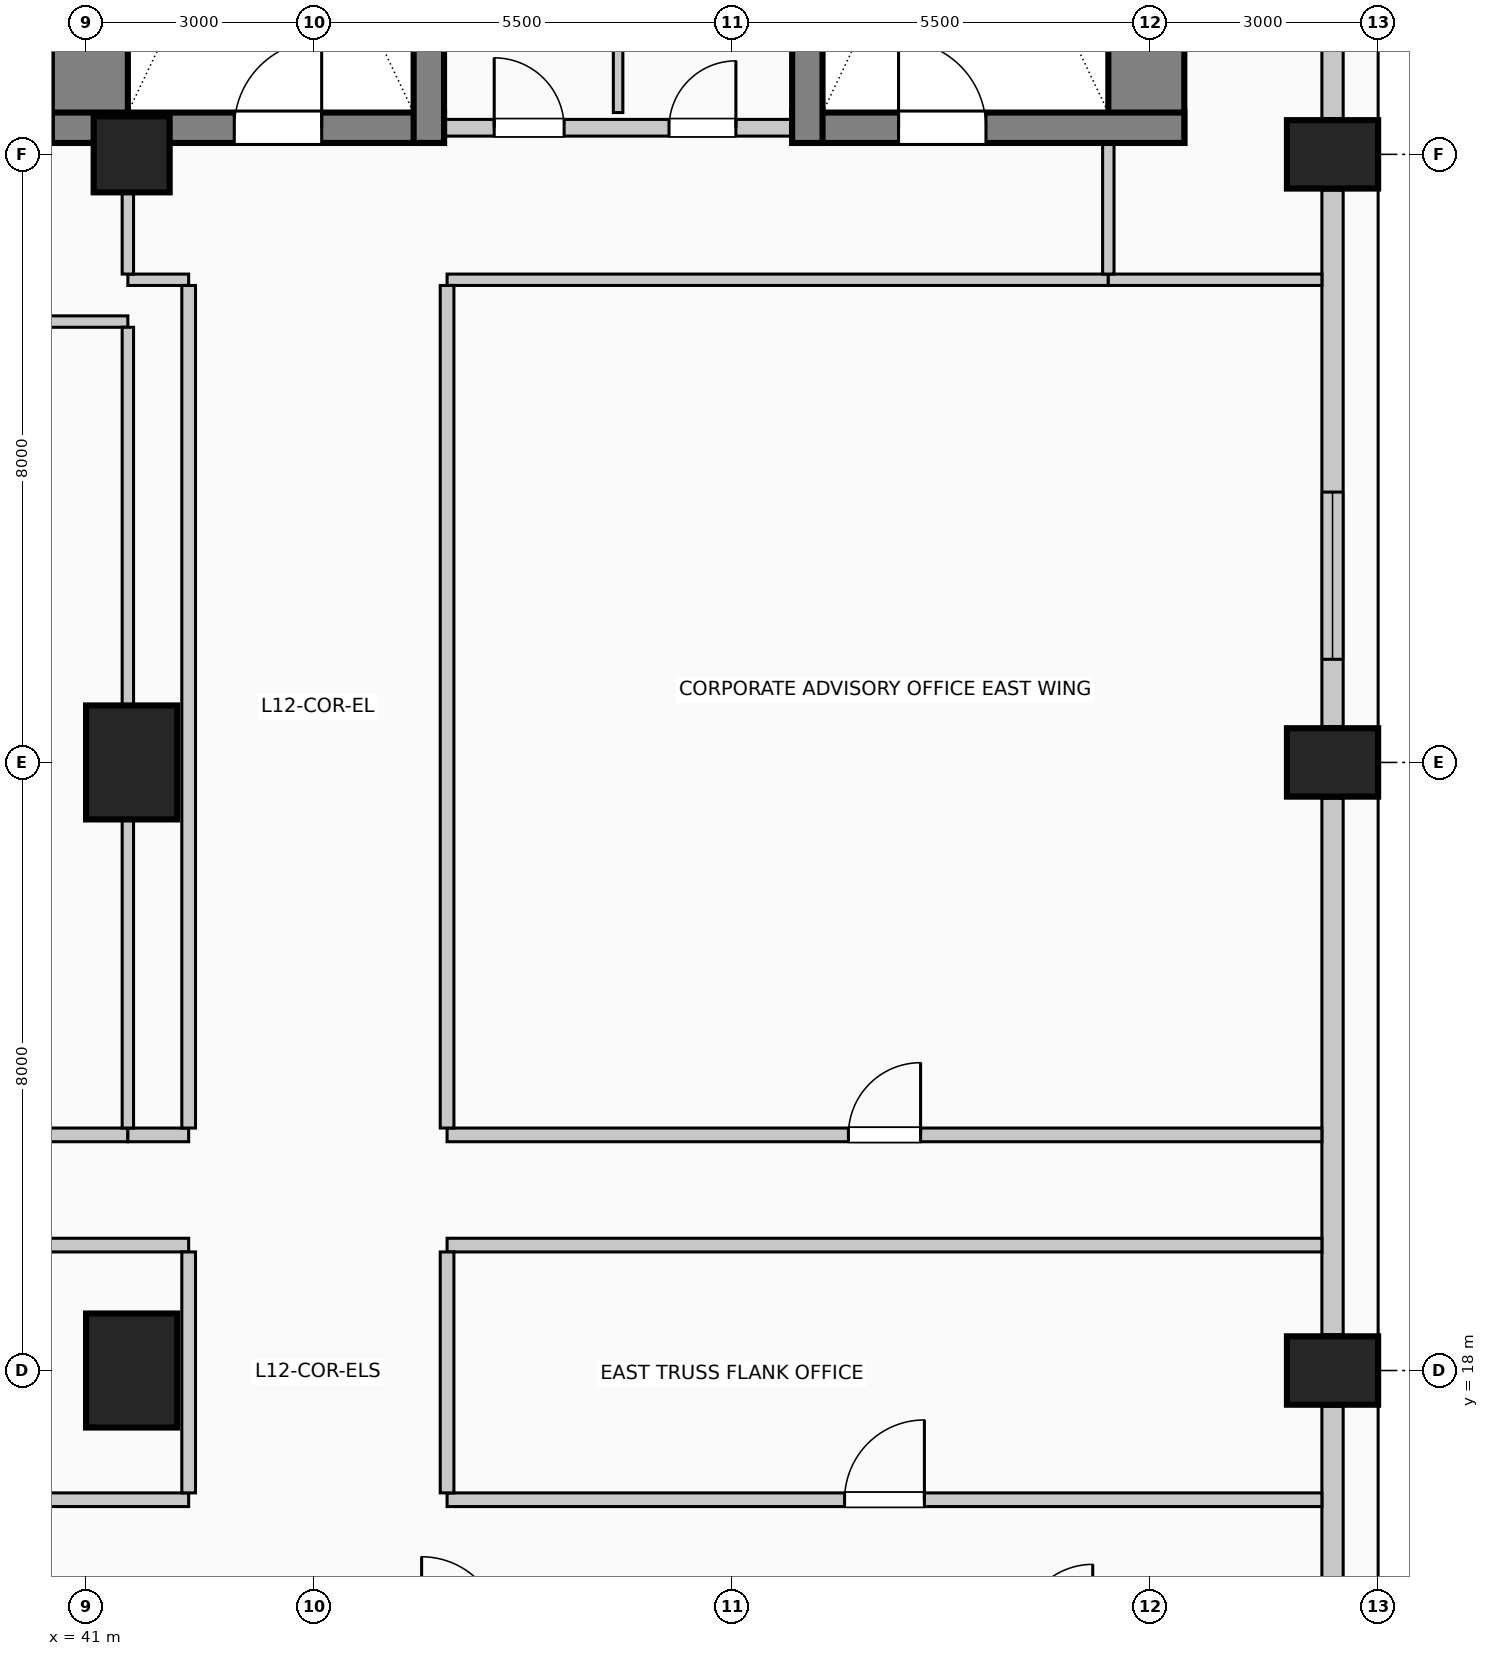
"""IFC4 building model, lengths in metres.
Left out: names, types, materials, properties, quantities, classifications, styles, units other than length and angle.
Written with IfcOpenShell. Run it as: python <this file> out.ifc"""

import sys

from ifc_helpers import new_model, si_unit, direction, frame, frame_2d, origin, origin_2d, place, context, subcontext, project, spatial, rectangle, circle, extrude, element, fill, save


model = new_model("IFC4")
c1 = context("Model", 3, precision=1e-05, world=origin(), true_north=direction((0.0, 1.0)))
c2 = subcontext(c1, "Body", "Model", "MODEL_VIEW")
j1 = project(units=[si_unit("LENGTHUNIT", "METRE"), si_unit("PLANEANGLEUNIT", "RADIAN")], contexts=[c1])
p1 = place(None, origin())
s1 = spatial("IfcSite", under=j1, at=p1, CompositionType="ELEMENT")
p2 = place(p1, origin())
s2 = spatial("IfcBuilding", under=s1, at=p2, CompositionType="ELEMENT")
p3 = place(p2, frame((0.0, 0.0, 50.6)))
s3 = spatial("IfcBuildingStorey", under=s2, at=p3, CompositionType="ELEMENT", Elevation=50.6)
for number, where, z_axis, x_axis in (
    (1, (41.05, 34.15, 0.0), (0.0, 0.0, 1.0), (0.0, 1.0, 0.0)),
    (2, (54.95, 34.15, 0.0), (0.0, 0.0, 1.0), (0.0, 1.0, 0.0)),
):
    element("IfcWall", number, at=place(p3, frame(where, z_axis=z_axis, x_axis=x_axis)), inside=s3, PredefinedType="SHEAR", context=c2, shape_type="SweptSolid", body=[
        extrude(rectangle(XDim=9.28, YDim=1.0, at=frame_2d((4.64, 0.0))), origin(), (0.0, 0.0, 1.0), 4.0),
    ])
p4 = place(p3, frame((40.55, 34.35, 0.0), z_axis=(0.0, 0.0, 1.0), x_axis=(1.0, 0.0, 0.0)))
e3 = element("IfcWall", 3, at=p4, inside=s3, PredefinedType="SHEAR", context=c2, shape_type="SweptSolid", body=[
    extrude(rectangle(XDim=5.16, YDim=0.4, at=frame_2d((2.58, 0.0))), origin(), (0.0, 0.0, 1.0), 4.0),
])
p5 = place(p4, frame((2.4, 0.0, 0.0)))
e4 = element("IfcOpeningElement", 4, at=p5, cuts=e3, PredefinedType="OPENING", context=c2, shape_type="SweptSolid", body=[
    extrude(rectangle(XDim=1.15, YDim=2.2, at=frame_2d((0.575, 1.1))), frame((0.0, 0.21, 0.0), z_axis=(0.0, -1.0, 0.0), x_axis=(1.0, 0.0, 0.0)), (0.0, 0.0, 1.0), 0.42),
])
p6 = place(p3, frame((45.51, 34.15, 0.0), z_axis=(0.0, 0.0, 1.0), x_axis=(0.0, 1.0, 0.0)))
e5 = element("IfcWall", 5, at=p6, inside=s3, PredefinedType="SHEAR", context=c2, shape_type="SweptSolid", body=[
    extrude(rectangle(XDim=9.28, YDim=0.4, at=frame_2d((4.64, 0.0))), origin(), (0.0, 0.0, 1.0), 4.0),
])
p7 = place(p3, frame((50.29, 34.35, 0.0), z_axis=(0.0, 0.0, 1.0), x_axis=(1.0, 0.0, 0.0)))
e6 = element("IfcWall", 6, at=p7, inside=s3, PredefinedType="SHEAR", context=c2, shape_type="SweptSolid", body=[
    extrude(rectangle(XDim=5.16, YDim=0.4, at=frame_2d((2.58, 0.0))), origin(), (0.0, 0.0, 1.0), 4.0),
])
p8 = place(p7, frame((1.4, 0.0, 0.0)))
e7 = element("IfcOpeningElement", 7, at=p8, cuts=e6, PredefinedType="OPENING", context=c2, shape_type="SweptSolid", body=[
    extrude(rectangle(XDim=1.15, YDim=2.2, at=frame_2d((0.575, 1.1))), frame((0.0, 0.21, 0.0), z_axis=(0.0, -1.0, 0.0), x_axis=(1.0, 0.0, 0.0)), (0.0, 0.0, 1.0), 0.42),
])
p9 = place(p3, frame((50.49, 34.15, 0.0), z_axis=(0.0, 0.0, 1.0), x_axis=(0.0, 1.0, 0.0)))
e8 = element("IfcWall", 8, at=p9, inside=s3, PredefinedType="SHEAR", context=c2, shape_type="SweptSolid", body=[
    extrude(rectangle(XDim=9.28, YDim=0.4, at=frame_2d((4.64, 0.0))), origin(), (0.0, 0.0, 1.0), 4.0),
])
for number, where, z_axis, x_axis in (
    (9, (57.4, 18.0, 0.0), (0.0, 0.0, 1.0), (0.0, 1.0, 0.0)),
    (10, (57.4, 26.0, 0.0), (0.0, 0.0, 1.0), (0.0, 1.0, 0.0)),
    (11, (57.4, 34.0, 0.0), (0.0, 0.0, 1.0), (0.0, 1.0, 0.0)),
):
    element("IfcColumn", number, at=place(p3, frame(where, z_axis=z_axis, x_axis=x_axis)), inside=s3, PredefinedType="COLUMN", context=c2, shape_type="SweptSolid", body=[
        extrude(rectangle(XDim=0.9, YDim=1.2, at=origin_2d()), origin(), (0.0, 0.0, 1.0), 4.0),
    ])
for number, where, z_axis, x_axis in (
    (12, (41.6, 18.0, 0.0), (0.0, 0.0, 1.0), (1.0, 0.0, 0.0)),
    (13, (41.6, 26.0, 0.0), (0.0, 0.0, 1.0), (1.0, 0.0, 0.0)),
):
    element("IfcColumn", number, at=place(p3, frame(where, z_axis=z_axis, x_axis=x_axis)), inside=s3, PredefinedType="COLUMN", context=c2, shape_type="SweptSolid", body=[
        extrude(rectangle(XDim=1.2, YDim=1.5, at=origin_2d()), origin(), (0.0, 0.0, 1.0), 4.0),
    ])
p10 = place(p3, frame((41.6, 34.0, 0.0), z_axis=(0.0, 0.0, 1.0), x_axis=(1.0, 0.0, 0.0)))
e14 = element("IfcColumn", 14, at=p10, inside=s3, PredefinedType="COLUMN", context=c2, shape_type="SweptSolid", body=[
    extrude(circle(Radius=0.5, at=origin_2d()), origin(), (0.0, 0.0, 1.0), 4.0),
])
p11 = place(p3, frame((57.4, 17.53, 0.0), z_axis=(0.0, 0.0, 1.0), x_axis=(0.0, -1.0, 0.0)))
e15 = element("IfcWall", 15, at=p11, inside=s3, PredefinedType="SOLIDWALL", context=c2, shape_type="SweptSolid", body=[
    extrude(rectangle(XDim=7.06, YDim=0.28, at=frame_2d((3.53, 0.0))), origin(), (0.0, 0.0, 1.0), 2.85),
])
p12 = place(p11, frame((3.973, 0.0, 0.5)))
e16 = element("IfcOpeningElement", 16, at=p12, cuts=e15, PredefinedType="OPENING", context=c2, shape_type="SweptSolid", body=[
    extrude(rectangle(XDim=2.2, YDim=1.95, at=frame_2d((1.1, 0.975))), frame((0.0, 0.15, 0.0), z_axis=(0.0, -1.0, 0.0), x_axis=(1.0, 0.0, 0.0)), (0.0, 0.0, 1.0), 0.3),
])
p13 = place(p3, frame((57.4, 25.53, 0.0), z_axis=(0.0, 0.0, 1.0), x_axis=(0.0, -1.0, 0.0)))
e17 = element("IfcWall", 17, at=p13, inside=s3, PredefinedType="SOLIDWALL", context=c2, shape_type="SweptSolid", body=[
    extrude(rectangle(XDim=7.06, YDim=0.28, at=frame_2d((3.53, 0.0))), origin(), (0.0, 0.0, 1.0), 2.85),
])
p14 = place(p3, frame((57.4, 33.53, 0.0), z_axis=(0.0, 0.0, 1.0), x_axis=(0.0, -1.0, 0.0)))
e18 = element("IfcWall", 18, at=p14, inside=s3, PredefinedType="SOLIDWALL", context=c2, shape_type="SweptSolid", body=[
    extrude(rectangle(XDim=7.06, YDim=0.28, at=frame_2d((3.53, 0.0))), origin(), (0.0, 0.0, 1.0), 2.85),
])
p15 = place(p14, frame((3.973, 0.0, 0.5)))
e19 = element("IfcOpeningElement", 19, at=p15, cuts=e18, PredefinedType="OPENING", context=c2, shape_type="SweptSolid", body=[
    extrude(rectangle(XDim=2.2, YDim=1.95, at=frame_2d((1.1, 0.975))), frame((0.0, 0.15, 0.0), z_axis=(0.0, -1.0, 0.0), x_axis=(1.0, 0.0, 0.0)), (0.0, 0.0, 1.0), 0.3),
])
p16 = place(p3, frame((57.4, 41.93, 0.0), z_axis=(0.0, 0.0, 1.0), x_axis=(0.0, -1.0, 0.0)))
e20 = element("IfcWall", 20, at=p16, inside=s3, PredefinedType="SOLIDWALL", context=c2, shape_type="SweptSolid", body=[
    extrude(rectangle(XDim=7.46, YDim=0.28, at=frame_2d((3.73, 0.0))), origin(), (0.0, 0.0, 1.0), 2.85),
])
p17 = place(p3, frame((45.72, 34.35, 0.0), z_axis=(0.0, 0.0, 1.0), x_axis=(1.0, 0.0, 0.0)))
e21 = element("IfcWall", 21, at=p17, inside=s3, PredefinedType="PARTITIONING", context=c2, shape_type="SweptSolid", body=[
    extrude(rectangle(XDim=4.56, YDim=0.22, at=frame_2d((2.28, 0.0))), origin(), (0.0, 0.0, 1.0), 3.7),
])
p18 = place(p17, frame((0.65, 0.0, 0.0)))
e22 = element("IfcOpeningElement", 22, at=p18, cuts=e21, PredefinedType="OPENING", context=c2, shape_type="SweptSolid", body=[
    extrude(rectangle(XDim=0.92, YDim=2.1, at=frame_2d((0.46, 1.05))), frame((0.0, 0.12, 0.0), z_axis=(0.0, -1.0, 0.0), x_axis=(1.0, 0.0, 0.0)), (0.0, 0.0, 1.0), 0.24),
])
p19 = place(p17, frame((2.95, 0.0, 0.0)))
e23 = element("IfcOpeningElement", 23, at=p19, cuts=e21, PredefinedType="OPENING", context=c2, shape_type="SweptSolid", body=[
    extrude(rectangle(XDim=0.88, YDim=2.1, at=frame_2d((0.44, 1.05))), frame((0.0, 0.12, 0.0), z_axis=(0.0, -1.0, 0.0), x_axis=(1.0, 0.0, 0.0)), (0.0, 0.0, 1.0), 0.24),
])
p20 = place(p3, frame((15.65, 16.3, 0.0), z_axis=(0.0, 0.0, 1.0), x_axis=(1.0, 0.0, 0.0)))
e24 = element("IfcWall", 24, at=p20, inside=s3, PredefinedType="PARTITIONING", context=c2, shape_type="SweptSolid", body=[
    extrude(rectangle(XDim=26.7, YDim=0.18, at=frame_2d((13.35, 0.0))), origin(), (0.0, 0.0, 1.0), 3.7),
])
p21 = place(p3, frame((45.75, 16.3, 0.0), z_axis=(0.0, 0.0, 1.0), x_axis=(1.0, 0.0, 0.0)))
e25 = element("IfcWall", 25, at=p21, inside=s3, PredefinedType="PARTITIONING", context=c2, shape_type="SweptSolid", body=[
    extrude(rectangle(XDim=11.51, YDim=0.18, at=frame_2d((5.755, 0.0))), origin(), (0.0, 0.0, 1.0), 3.7),
])
p22 = place(p21, frame((5.23, 0.0, 0.0)))
e26 = element("IfcOpeningElement", 26, at=p22, cuts=e25, PredefinedType="OPENING", context=c2, shape_type="SweptSolid", body=[
    extrude(rectangle(XDim=1.05, YDim=2.15, at=frame_2d((0.525, 1.075))), frame((0.0, 0.1, 0.0), z_axis=(0.0, -1.0, 0.0), x_axis=(1.0, 0.0, 0.0)), (0.0, 0.0, 1.0), 0.2),
])
p23 = place(p3, frame((15.65, 19.65, 0.0), z_axis=(0.0, 0.0, 1.0), x_axis=(1.0, 0.0, 0.0)))
e27 = element("IfcWall", 27, at=p23, inside=s3, PredefinedType="PARTITIONING", context=c2, shape_type="SweptSolid", body=[
    extrude(rectangle(XDim=26.7, YDim=0.18, at=frame_2d((13.35, 0.0))), origin(), (0.0, 0.0, 1.0), 3.7),
])
p24 = place(p3, frame((45.75, 19.65, 0.0), z_axis=(0.0, 0.0, 1.0), x_axis=(1.0, 0.0, 0.0)))
e28 = element("IfcWall", 28, at=p24, inside=s3, PredefinedType="PARTITIONING", context=c2, shape_type="SweptSolid", body=[
    extrude(rectangle(XDim=11.51, YDim=0.18, at=frame_2d((5.755, 0.0))), origin(), (0.0, 0.0, 1.0), 3.7),
])
p25 = place(p3, frame((20.3, 21.1, 0.0), z_axis=(0.0, 0.0, 1.0), x_axis=(1.0, 0.0, 0.0)))
e29 = element("IfcWall", 29, at=p25, inside=s3, PredefinedType="PARTITIONING", context=c2, shape_type="SweptSolid", body=[
    extrude(rectangle(XDim=21.25, YDim=0.18, at=frame_2d((10.625, 0.0))), origin(), (0.0, 0.0, 1.0), 3.7),
])
p26 = place(p25, frame((10.15, 0.0, 0.0)))
e30 = element("IfcOpeningElement", 30, at=p26, cuts=e29, PredefinedType="OPENING", context=c2, shape_type="SweptSolid", body=[
    extrude(rectangle(XDim=0.95, YDim=2.15, at=frame_2d((0.475, 1.075))), frame((0.0, 0.1, 0.0), z_axis=(0.0, -1.0, 0.0), x_axis=(1.0, 0.0, 0.0)), (0.0, 0.0, 1.0), 0.2),
])
p27 = place(p3, frame((41.55, 21.1, 0.0), z_axis=(0.0, 0.0, 1.0), x_axis=(1.0, 0.0, 0.0)))
e31 = element("IfcWall", 31, at=p27, inside=s3, PredefinedType="PARTITIONING", context=c2, shape_type="SweptSolid", body=[
    extrude(rectangle(XDim=0.8, YDim=0.18, at=frame_2d((0.4, 0.0))), origin(), (0.0, 0.0, 1.0), 3.7),
])
p28 = place(p3, frame((45.75, 21.1, 0.0), z_axis=(0.0, 0.0, 1.0), x_axis=(1.0, 0.0, 0.0)))
e32 = element("IfcWall", 32, at=p28, inside=s3, PredefinedType="PARTITIONING", context=c2, shape_type="SweptSolid", body=[
    extrude(rectangle(XDim=11.51, YDim=0.18, at=frame_2d((5.755, 0.0))), origin(), (0.0, 0.0, 1.0), 3.7),
])
p29 = place(p28, frame((5.28, 0.0, 0.0)))
e33 = element("IfcOpeningElement", 33, at=p29, cuts=e32, PredefinedType="OPENING", context=c2, shape_type="SweptSolid", body=[
    extrude(rectangle(XDim=0.95, YDim=2.15, at=frame_2d((0.475, 1.075))), frame((0.0, 0.1, 0.0), z_axis=(0.0, -1.0, 0.0), x_axis=(1.0, 0.0, 0.0)), (0.0, 0.0, 1.0), 0.2),
])
p30 = place(p3, frame((20.3, 31.8, 0.0), z_axis=(0.0, 0.0, 1.0), x_axis=(1.0, 0.0, 0.0)))
e34 = element("IfcWall", 34, at=p30, inside=s3, PredefinedType="PARTITIONING", context=c2, shape_type="SweptSolid", body=[
    extrude(rectangle(XDim=21.25, YDim=0.15, at=frame_2d((10.625, 0.0))), origin(), (0.0, 0.0, 1.0), 3.7),
])
p31 = place(p3, frame((41.55, 32.35, 0.0), z_axis=(0.0, 0.0, 1.0), x_axis=(1.0, 0.0, 0.0)))
e35 = element("IfcWall", 35, at=p31, inside=s3, PredefinedType="PARTITIONING", context=c2, shape_type="SweptSolid", body=[
    extrude(rectangle(XDim=0.8, YDim=0.15, at=frame_2d((0.4, 0.0))), origin(), (0.0, 0.0, 1.0), 3.7),
])
p32 = place(p3, frame((45.75, 32.35, 0.0), z_axis=(0.0, 0.0, 1.0), x_axis=(1.0, 0.0, 0.0)))
e36 = element("IfcWall", 36, at=p32, inside=s3, PredefinedType="PARTITIONING", context=c2, shape_type="SweptSolid", body=[
    extrude(rectangle(XDim=8.7, YDim=0.15, at=frame_2d((4.35, 0.0))), origin(), (0.0, 0.0, 1.0), 3.7),
])
p33 = place(p3, frame((54.45, 32.35, 0.0), z_axis=(0.0, 0.0, 1.0), x_axis=(1.0, 0.0, 0.0)))
e37 = element("IfcWall", 37, at=p33, inside=s3, PredefinedType="PARTITIONING", context=c2, shape_type="SweptSolid", body=[
    extrude(rectangle(XDim=2.81, YDim=0.15, at=frame_2d((1.405, 0.0))), origin(), (0.0, 0.0, 1.0), 3.7),
])
p34 = place(p3, frame((41.55, 21.19, 0.0), z_axis=(0.0, 0.0, 1.0), x_axis=(0.0, 1.0, 0.0)))
e38 = element("IfcWall", 38, at=p34, inside=s3, PredefinedType="PARTITIONING", context=c2, shape_type="SweptSolid", body=[
    extrude(rectangle(XDim=4.06, YDim=0.15, at=frame_2d((2.03, 0.0))), origin(), (0.0, 0.0, 1.0), 2.995),
])
p35 = place(p3, frame((41.55, 26.75, 0.0), z_axis=(0.0, 0.0, 1.0), x_axis=(0.0, 1.0, 0.0)))
e39 = element("IfcWall", 39, at=p35, inside=s3, PredefinedType="PARTITIONING", context=c2, shape_type="SweptSolid", body=[
    extrude(rectangle(XDim=4.975, YDim=0.15, at=frame_2d((2.488, 0.0))), origin(), (0.0, 0.0, 1.0), 2.995),
])
p36 = place(p3, frame((41.55, 32.425, 0.0), z_axis=(0.0, 0.0, 1.0), x_axis=(0.0, 1.0, 0.0)))
e40 = element("IfcWall", 40, at=p36, inside=s3, PredefinedType="PARTITIONING", context=c2, shape_type="SweptSolid", body=[
    extrude(rectangle(XDim=1.075, YDim=0.15, at=frame_2d((0.538, 0.0))), origin(), (0.0, 0.0, 1.0), 2.995),
])
p37 = place(p3, frame((42.35, 16.39, 0.0), z_axis=(0.0, 0.0, 1.0), x_axis=(0.0, 1.0, 0.0)))
e41 = element("IfcWall", 41, at=p37, inside=s3, PredefinedType="PARTITIONING", context=c2, shape_type="SweptSolid", body=[
    extrude(rectangle(XDim=3.17, YDim=0.18, at=frame_2d((1.585, 0.0))), origin(), (0.0, 0.0, 1.0), 3.7),
])
p38 = place(p3, frame((42.35, 21.19, 0.0), z_axis=(0.0, 0.0, 1.0), x_axis=(0.0, 1.0, 0.0)))
e42 = element("IfcWall", 42, at=p38, inside=s3, PredefinedType="PARTITIONING", context=c2, shape_type="SweptSolid", body=[
    extrude(rectangle(XDim=11.085, YDim=0.18, at=frame_2d((5.542, 0.0))), origin(), (0.0, 0.0, 1.0), 3.7),
])
p39 = place(p3, frame((45.75, 16.39, 0.0), z_axis=(0.0, 0.0, 1.0), x_axis=(0.0, 1.0, 0.0)))
e43 = element("IfcWall", 43, at=p39, inside=s3, PredefinedType="PARTITIONING", context=c2, shape_type="SweptSolid", body=[
    extrude(rectangle(XDim=3.17, YDim=0.18, at=frame_2d((1.585, 0.0))), origin(), (0.0, 0.0, 1.0), 3.7),
])
p40 = place(p3, frame((45.75, 21.19, 0.0), z_axis=(0.0, 0.0, 1.0), x_axis=(0.0, 1.0, 0.0)))
e44 = element("IfcWall", 44, at=p40, inside=s3, PredefinedType="PARTITIONING", context=c2, shape_type="SweptSolid", body=[
    extrude(rectangle(XDim=11.085, YDim=0.18, at=frame_2d((5.542, 0.0))), origin(), (0.0, 0.0, 1.0), 3.7),
])
p41 = place(p3, frame((48.0, 34.55, 0.0), z_axis=(0.0, 0.0, 1.0), x_axis=(0.0, 1.0, 0.0)))
e45 = element("IfcWall", 45, at=p41, inside=s3, PredefinedType="PARTITIONING", context=c2, shape_type="SweptSolid", body=[
    extrude(rectangle(XDim=7.475, YDim=0.125, at=frame_2d((3.737, 0.0))), origin(), (0.0, 0.0, 1.0), 3.7),
])
p42 = place(p3, frame((54.45, 32.425, 0.0), z_axis=(0.0, 0.0, 1.0), x_axis=(0.0, 1.0, 0.0)))
e46 = element("IfcWall", 46, at=p42, inside=s3, PredefinedType="PARTITIONING", context=c2, shape_type="SweptSolid", body=[
    extrude(rectangle(XDim=1.725, YDim=0.15, at=frame_2d((0.862, 0.0))), origin(), (0.0, 0.0, 1.0), 3.7),
])
p43 = place(p15, origin())
e47 = element("IfcWindow", 47, at=p43, inside=s3, PartitioningType="SINGLE_PANEL", PredefinedType="WINDOW", context=c2, shape_type="SweptSolid", body=[
    extrude(rectangle(XDim=2.2, YDim=1.95, at=frame_2d((1.1, 0.975))), frame((0.0, 0.03, 0.0), z_axis=(0.0, -1.0, 0.0), x_axis=(1.0, 0.0, 0.0)), (0.0, 0.0, 1.0), 0.06),
])
fill(e19, e47)
p44 = place(p5, origin())
e48 = element("IfcDoor", 48, at=p44, inside=s3, OperationType="SINGLE_SWING_RIGHT", PredefinedType="DOOR", context=c2, shape_type="SweptSolid", body=[
    extrude(rectangle(XDim=1.15, YDim=2.2, at=frame_2d((0.575, 1.1))), frame((0.0, 0.025, 0.0), z_axis=(0.0, -1.0, 0.0), x_axis=(1.0, 0.0, 0.0)), (0.0, 0.0, 1.0), 0.05),
])
fill(e4, e48)
p45 = place(p18, origin())
e49 = element("IfcDoor", 49, at=p45, inside=s3, OperationType="SINGLE_SWING_LEFT", PredefinedType="DOOR", context=c2, shape_type="SweptSolid", body=[
    extrude(rectangle(XDim=0.92, YDim=2.1, at=frame_2d((0.46, 1.05))), frame((0.0, 0.025, 0.0), z_axis=(0.0, -1.0, 0.0), x_axis=(1.0, 0.0, 0.0)), (0.0, 0.0, 1.0), 0.05),
])
fill(e22, e49)
p46 = place(p19, origin())
e50 = element("IfcDoor", 50, at=p46, inside=s3, OperationType="SINGLE_SWING_RIGHT", PredefinedType="DOOR", context=c2, shape_type="SweptSolid", body=[
    extrude(rectangle(XDim=0.88, YDim=2.1, at=frame_2d((0.44, 1.05))), frame((0.0, 0.025, 0.0), z_axis=(0.0, -1.0, 0.0), x_axis=(1.0, 0.0, 0.0)), (0.0, 0.0, 1.0), 0.05),
])
fill(e23, e50)
p47 = place(p8, origin())
e51 = element("IfcDoor", 51, at=p47, inside=s3, OperationType="SINGLE_SWING_LEFT", PredefinedType="DOOR", context=c2, shape_type="SweptSolid", body=[
    extrude(rectangle(XDim=1.15, YDim=2.2, at=frame_2d((0.575, 1.1))), frame((0.0, 0.025, 0.0), z_axis=(0.0, -1.0, 0.0), x_axis=(1.0, 0.0, 0.0)), (0.0, 0.0, 1.0), 0.05),
])
fill(e7, e51)
p48 = place(p22, origin())
e52 = element("IfcDoor", 52, at=p48, inside=s3, OperationType="SINGLE_SWING_RIGHT", PredefinedType="DOOR", context=c2, shape_type="SweptSolid", body=[
    extrude(rectangle(XDim=1.05, YDim=2.15, at=frame_2d((0.525, 1.075))), frame((0.0, 0.025, 0.0), z_axis=(0.0, -1.0, 0.0), x_axis=(1.0, 0.0, 0.0)), (0.0, 0.0, 1.0), 0.05),
])
fill(e26, e52)
p49 = place(p29, origin())
e53 = element("IfcDoor", 53, at=p49, inside=s3, OperationType="SINGLE_SWING_RIGHT", PredefinedType="DOOR", context=c2, shape_type="SweptSolid", body=[
    extrude(rectangle(XDim=0.95, YDim=2.15, at=frame_2d((0.475, 1.075))), frame((0.0, 0.025, 0.0), z_axis=(0.0, -1.0, 0.0), x_axis=(1.0, 0.0, 0.0)), (0.0, 0.0, 1.0), 0.05),
])
fill(e33, e53)
save(model, sys.argv[1])
